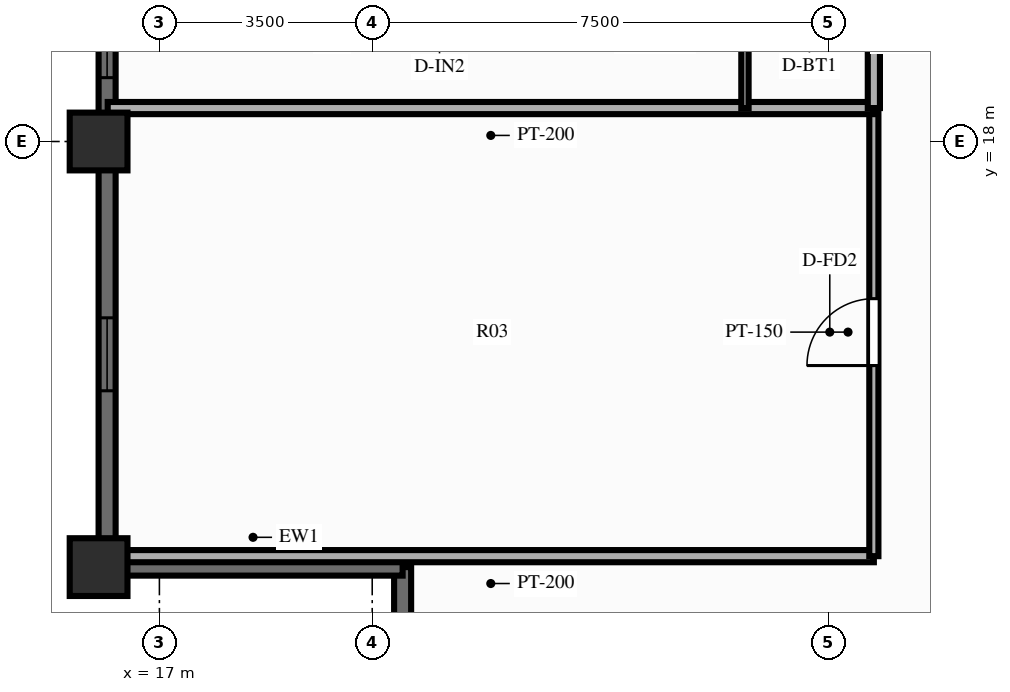
"""IFC4 building model, lengths in metres.
Left out: names, types, materials, properties, quantities, classifications, styles, units other than length and angle.
Written with IfcOpenShell. Run it as: python <this file> out.ifc"""

import sys

from ifc_helpers import new_model, si_unit, direction, frame, frame_2d, origin, origin_2d, place, context, subcontext, project, spatial, rectangle, extrude, source, transform, mapped, element, fill, save


model = new_model("IFC4")
c1 = context("Model", 3, precision=1e-05, world=origin(), true_north=direction((0.0, 1.0)))
c2 = subcontext(c1, "Body", "Model", "MODEL_VIEW")
j1 = project(units=[si_unit("LENGTHUNIT", "METRE"), si_unit("PLANEANGLEUNIT", "RADIAN")], contexts=[c1])
p1 = place(None, origin())
s1 = spatial("IfcSite", under=j1, at=p1, CompositionType="ELEMENT")
p2 = place(p1, origin())
s2 = spatial("IfcBuilding", under=s1, at=p2, CompositionType="ELEMENT")
p3 = place(p2, frame((0.0, 0.0, 148.7)))
s3 = spatial("IfcBuildingStorey", under=s2, at=p3, CompositionType="ELEMENT", Elevation=148.7)
m1 = source(origin(), c2, "Body", "SweptSolid", [
    extrude(rectangle(XDim=0.95, YDim=0.95, at=origin_2d()), origin(), (0.0, 0.0, 1.0), 3.5),
])
for number, where, z_axis, x_axis in (
    (1, (16.0, 18.0, 0.0), (0.0, 0.0, 1.0), (1.0, 0.0, 0.0)),
    (2, (16.0, 11.0, 0.0), (0.0, 0.0, 1.0), (1.0, 0.0, 0.0)),
):
    element("IfcColumn", number, at=place(p3, frame(where, z_axis=z_axis, x_axis=x_axis)), inside=s3, PredefinedType="COLUMN", context=c2, shape_type="MappedRepresentation", body=[
        mapped(m1, transform((0.0, 0.0, 0.0), scale=1.0)),
    ])
p4 = place(p3, frame((16.14, 11.0, 0.0), z_axis=(0.0, 0.0, 1.0), x_axis=(0.0, 1.0, 0.0)))
e3 = element("IfcWall", 3, at=p4, inside=s3, PredefinedType="SOLIDWALL", context=c2, shape_type="SweptSolid", body=[
    extrude(rectangle(XDim=32.0, YDim=0.28, at=frame_2d((16.0, 0.0))), origin(), (0.0, 0.0, 1.0), 2.39),
])
p5 = place(p4, frame((2.9, 0.0, 0.25)))
e4 = element("IfcOpeningElement", 4, at=p5, cuts=e3, PredefinedType="OPENING", context=c2, shape_type="SweptSolid", body=[
    extrude(rectangle(XDim=1.2, YDim=1.5, at=frame_2d((0.6, 0.75))), frame((0.0, 0.152, 0.0), z_axis=(0.0, -1.0, 0.0), x_axis=(1.0, 0.0, 0.0)), (0.0, 0.0, 1.0), 0.304),
])
p6 = place(p4, frame((8.05, 0.0, 0.25)))
e5 = element("IfcOpeningElement", 5, at=p6, cuts=e3, PredefinedType="OPENING", context=c2, shape_type="SweptSolid", body=[
    extrude(rectangle(XDim=1.2, YDim=1.5, at=frame_2d((0.6, 0.75))), frame((0.0, 0.152, 0.0), z_axis=(0.0, -1.0, 0.0), x_axis=(1.0, 0.0, 0.0)), (0.0, 0.0, 1.0), 0.304),
])
p7 = place(p4, frame((10.335, 0.0, 0.25)))
e6 = element("IfcOpeningElement", 6, at=p7, cuts=e3, PredefinedType="OPENING", context=c2, shape_type="SweptSolid", body=[
    extrude(rectangle(XDim=1.2, YDim=1.5, at=frame_2d((0.6, 0.75))), frame((0.0, 0.152, 0.0), z_axis=(0.0, -1.0, 0.0), x_axis=(1.0, 0.0, 0.0)), (0.0, 0.0, 1.0), 0.304),
])
p8 = place(p4, frame((12.92, 0.0, 0.25)))
e7 = element("IfcOpeningElement", 7, at=p8, cuts=e3, PredefinedType="OPENING", context=c2, shape_type="SweptSolid", body=[
    extrude(rectangle(XDim=1.2, YDim=1.5, at=frame_2d((0.6, 0.75))), frame((0.0, 0.152, 0.0), z_axis=(0.0, -1.0, 0.0), x_axis=(1.0, 0.0, 0.0)), (0.0, 0.0, 1.0), 0.304),
])
p9 = place(p4, frame((15.4, 0.0, 0.25)))
e8 = element("IfcOpeningElement", 8, at=p9, cuts=e3, PredefinedType="OPENING", context=c2, shape_type="SweptSolid", body=[
    extrude(rectangle(XDim=1.2, YDim=1.5, at=frame_2d((0.6, 0.75))), frame((0.0, 0.152, 0.0), z_axis=(0.0, -1.0, 0.0), x_axis=(1.0, 0.0, 0.0)), (0.0, 0.0, 1.0), 0.304),
])
p10 = place(p4, frame((17.58, 0.0, 0.25)))
e9 = element("IfcOpeningElement", 9, at=p10, cuts=e3, PredefinedType="OPENING", context=c2, shape_type="SweptSolid", body=[
    extrude(rectangle(XDim=1.2, YDim=1.5, at=frame_2d((0.6, 0.75))), frame((0.0, 0.152, 0.0), z_axis=(0.0, -1.0, 0.0), x_axis=(1.0, 0.0, 0.0)), (0.0, 0.0, 1.0), 0.304),
])
p11 = place(p4, frame((19.865, 0.0, 0.25)))
e10 = element("IfcOpeningElement", 10, at=p11, cuts=e3, PredefinedType="OPENING", context=c2, shape_type="SweptSolid", body=[
    extrude(rectangle(XDim=1.2, YDim=1.5, at=frame_2d((0.6, 0.75))), frame((0.0, 0.152, 0.0), z_axis=(0.0, -1.0, 0.0), x_axis=(1.0, 0.0, 0.0)), (0.0, 0.0, 1.0), 0.304),
])
p12 = place(p4, frame((22.45, 0.0, 0.25)))
e11 = element("IfcOpeningElement", 11, at=p12, cuts=e3, PredefinedType="OPENING", context=c2, shape_type="SweptSolid", body=[
    extrude(rectangle(XDim=1.2, YDim=1.5, at=frame_2d((0.6, 0.75))), frame((0.0, 0.152, 0.0), z_axis=(0.0, -1.0, 0.0), x_axis=(1.0, 0.0, 0.0)), (0.0, 0.0, 1.0), 0.304),
])
p13 = place(p4, frame((27.9, 0.0, 0.25)))
e12 = element("IfcOpeningElement", 12, at=p13, cuts=e3, PredefinedType="OPENING", context=c2, shape_type="SweptSolid", body=[
    extrude(rectangle(XDim=1.2, YDim=1.5, at=frame_2d((0.6, 0.75))), frame((0.0, 0.152, 0.0), z_axis=(0.0, -1.0, 0.0), x_axis=(1.0, 0.0, 0.0)), (0.0, 0.0, 1.0), 0.304),
])
for number, where, z_axis, x_axis in (
    (13, (21.0, 6.08, 0.0), (0.0, 0.0, 1.0), (0.0, 1.0, 0.0)),
    (14, (16.08, 11.0, 0.0), (0.0, 0.0, 1.0), (1.0, 0.0, 0.0)),
):
    element("IfcWall", number, at=place(p3, frame(where, z_axis=z_axis, x_axis=x_axis)), inside=s3, PredefinedType="SOLIDWALL", context=c2, shape_type="SweptSolid", body=[
        extrude(rectangle(XDim=4.92, YDim=0.28, at=frame_2d((2.46, 0.0))), origin(), (0.0, 0.0, 1.0), 2.39),
    ])
p14 = place(p3, frame((28.75, 11.18, 0.0), z_axis=(0.0, 0.0, 1.0), x_axis=(-1.0, 0.0, 0.0)))
e15 = element("IfcWall", 15, at=p14, inside=s3, PredefinedType="PARTITIONING", context=c2, shape_type="SweptSolid", body=[
    extrude(rectangle(XDim=12.6, YDim=0.2, at=frame_2d((6.3, 0.0))), origin(), (0.0, 0.0, 1.0), 3.16),
])
p15 = place(p3, frame((28.75, 11.18, 0.0), z_axis=(0.0, 0.0, 1.0), x_axis=(0.0, 1.0, 0.0)))
e16 = element("IfcWall", 16, at=p15, inside=s3, PredefinedType="PARTITIONING", context=c2, shape_type="SweptSolid", body=[
    extrude(rectangle(XDim=7.37, YDim=0.15, at=frame_2d((3.685, 0.0))), origin(), (0.0, 0.0, 1.0), 3.16),
])
p16 = place(p15, frame((3.135, 0.0, 0.0)))
e17 = element("IfcOpeningElement", 17, at=p16, cuts=e16, PredefinedType="OPENING", context=c2, shape_type="SweptSolid", body=[
    extrude(rectangle(XDim=1.1, YDim=2.15, at=frame_2d((0.55, 1.075))), frame((0.0, 0.087, 0.0), z_axis=(0.0, -1.0, 0.0), x_axis=(1.0, 0.0, 0.0)), (0.0, 0.0, 1.0), 0.174),
])
p17 = place(p3, frame((28.75, 18.55, 0.0), z_axis=(0.0, 0.0, 1.0), x_axis=(-1.0, 0.0, 0.0)))
e18 = element("IfcWall", 18, at=p17, inside=s3, PredefinedType="PARTITIONING", context=c2, shape_type="SweptSolid", body=[
    extrude(rectangle(XDim=12.6, YDim=0.2, at=frame_2d((6.3, 0.0))), origin(), (0.0, 0.0, 1.0), 3.16),
])
p18 = place(p3, frame((28.75, 18.55, 0.0), z_axis=(0.0, 0.0, 1.0), x_axis=(0.0, 1.0, 0.0)))
e19 = element("IfcWall", 19, at=p18, inside=s3, PredefinedType="PARTITIONING", context=c2, shape_type="SweptSolid", body=[
    extrude(rectangle(XDim=2.2, YDim=0.2, at=frame_2d((1.1, 0.0))), origin(), (0.0, 0.0, 1.0), 3.16),
])
p19 = place(p3, frame((26.63, 18.55, 0.0), z_axis=(0.0, 0.0, 1.0), x_axis=(0.0, 1.0, 0.0)))
e20 = element("IfcWall", 20, at=p19, inside=s3, PredefinedType="PARTITIONING", context=c2, shape_type="SweptSolid", body=[
    extrude(rectangle(XDim=2.2, YDim=0.12, at=frame_2d((1.1, 0.0))), origin(), (0.0, 0.0, 1.0), 3.16),
])
m2 = source(origin(), c2, "Body", "SweptSolid", [
    extrude(rectangle(XDim=1.2, YDim=1.5, at=frame_2d((0.6, 0.75))), frame((0.0, 0.03, 0.0), z_axis=(0.0, -1.0, 0.0), x_axis=(1.0, 0.0, 0.0)), (0.0, 0.0, 1.0), 0.06),
])
p20 = place(p5, origin())
e21 = element("IfcWindow", 21, at=p20, inside=s3, PartitioningType="SINGLE_PANEL", PredefinedType="WINDOW", context=c2, shape_type="MappedRepresentation", body=[
    mapped(m2, transform((0.0, 0.0, 0.0), scale=1.0)),
])
fill(e4, e21)
p21 = place(p6, origin())
e22 = element("IfcWindow", 22, at=p21, inside=s3, PartitioningType="SINGLE_PANEL", PredefinedType="WINDOW", context=c2, shape_type="MappedRepresentation", body=[
    mapped(m2, transform((0.0, 0.0, 0.0), scale=1.0)),
])
fill(e5, e22)
m3 = source(origin(), c2, "Body", "SweptSolid", [
    extrude(rectangle(XDim=1.1, YDim=2.15, at=frame_2d((0.55, 1.075))), frame((0.0, 0.025, 0.0), z_axis=(0.0, -1.0, 0.0), x_axis=(1.0, 0.0, 0.0)), (0.0, 0.0, 1.0), 0.05),
])
p22 = place(p16, origin())
e23 = element("IfcDoor", 23, at=p22, inside=s3, OperationType="SINGLE_SWING_LEFT", PredefinedType="DOOR", context=c2, shape_type="MappedRepresentation", body=[
    mapped(m3, transform((0.0, 0.0, 0.0), scale=1.0)),
])
fill(e17, e23)
save(model, sys.argv[1])
